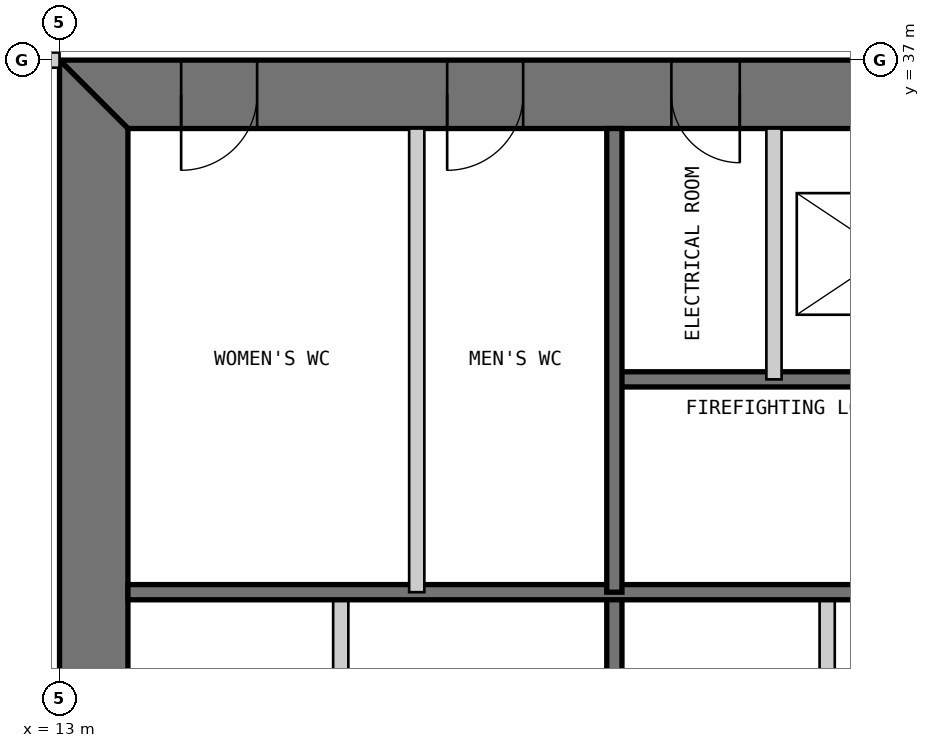
"""IFC4 building model, lengths in metres.
Left out: names, types, materials, properties, quantities, classifications, styles, units other than length and angle.
Written with IfcOpenShell. Run it as: python <this file> out.ifc"""

import sys

from ifc_helpers import new_model, si_unit, direction, frame, frame_2d, origin, place, context, subcontext, project, spatial, polyline, rectangle, outline, extrude, element, fill, save


model = new_model("IFC4")
c1 = context("Model", 3, precision=1e-05, world=origin(), true_north=direction((0.0, 1.0)))
c2 = subcontext(c1, "Body", "Model", "MODEL_VIEW")
j1 = project(units=[si_unit("LENGTHUNIT", "METRE"), si_unit("PLANEANGLEUNIT", "RADIAN")], contexts=[c1])
p1 = place(None, origin())
s1 = spatial("IfcSite", under=j1, at=p1, CompositionType="ELEMENT")
p2 = place(p1, origin())
s2 = spatial("IfcBuilding", under=s1, at=p2, CompositionType="ELEMENT")
p3 = place(p2, frame((0.0, 0.0, 7.0)))
s3 = spatial("IfcBuildingStorey", under=s2, at=p3, CompositionType="ELEMENT", Elevation=7.0)
p4 = place(p3, frame((37.0, 36.55, 0.0), z_axis=(0.0, 0.0, 1.0), x_axis=(-1.0, 0.0, 0.0)))
e1 = element("IfcWall", 1, at=p4, inside=s3, PredefinedType="SHEAR", context=c2, shape_type="SweptSolid", body=[
    extrude(outline(polyline([(0.0, -0.45), (24.0, -0.45), (23.1, 0.45), (0.9, 0.45), (0.0, -0.45)])), origin(), (0.0, 0.0, 1.0), 4.8),
])
p5 = place(p4, frame((4.9, 0.0, 0.0)))
e2 = element("IfcOpeningElement", 2, at=p5, cuts=e1, PredefinedType="OPENING", context=c2, shape_type="SweptSolid", body=[
    extrude(rectangle(XDim=1.0, YDim=2.2, at=frame_2d((0.5, 1.1))), frame((0.0, 0.46, 0.0), z_axis=(0.0, -1.0, 0.0), x_axis=(1.0, 0.0, 0.0)), (0.0, 0.0, 1.0), 0.92),
])
p6 = place(p4, frame((8.9, 0.0, 0.0)))
e3 = element("IfcOpeningElement", 3, at=p6, cuts=e1, PredefinedType="OPENING", context=c2, shape_type="SweptSolid", body=[
    extrude(rectangle(XDim=1.1, YDim=2.2, at=frame_2d((0.55, 1.1))), frame((0.0, 0.46, 0.0), z_axis=(0.0, -1.0, 0.0), x_axis=(1.0, 0.0, 0.0)), (0.0, 0.0, 1.0), 0.92),
])
p7 = place(p4, frame((15.05, 0.0, 0.0)))
e4 = element("IfcOpeningElement", 4, at=p7, cuts=e1, PredefinedType="OPENING", context=c2, shape_type="SweptSolid", body=[
    extrude(rectangle(XDim=0.9, YDim=2.2, at=frame_2d((0.45, 1.1))), frame((0.0, 0.46, 0.0), z_axis=(0.0, -1.0, 0.0), x_axis=(1.0, 0.0, 0.0)), (0.0, 0.0, 1.0), 0.92),
])
p8 = place(p4, frame((17.9, 0.0, 0.0)))
e5 = element("IfcOpeningElement", 5, at=p8, cuts=e1, PredefinedType="OPENING", context=c2, shape_type="SweptSolid", body=[
    extrude(rectangle(XDim=1.0, YDim=2.2, at=frame_2d((0.5, 1.1))), frame((0.0, 0.46, 0.0), z_axis=(0.0, -1.0, 0.0), x_axis=(1.0, 0.0, 0.0)), (0.0, 0.0, 1.0), 0.92),
])
p9 = place(p4, frame((21.4, 0.0, 0.0)))
e6 = element("IfcOpeningElement", 6, at=p9, cuts=e1, PredefinedType="OPENING", context=c2, shape_type="SweptSolid", body=[
    extrude(rectangle(XDim=1.0, YDim=2.2, at=frame_2d((0.5, 1.1))), frame((0.0, 0.46, 0.0), z_axis=(0.0, -1.0, 0.0), x_axis=(1.0, 0.0, 0.0)), (0.0, 0.0, 1.0), 0.92),
])
p10 = place(p3, frame((13.45, 36.1, 0.0), z_axis=(0.0, 0.0, 1.0), x_axis=(0.0, -1.0, 0.0)))
e7 = element("IfcWall", 7, at=p10, inside=s3, PredefinedType="SHEAR", context=c2, shape_type="SweptSolid", body=[
    extrude(outline(polyline([(-0.9, -0.45), (23.1, -0.45), (22.2, 0.45), (0.0, 0.45), (-0.9, -0.45)])), origin(), (0.0, 0.0, 1.0), 4.8),
])
p11 = place(p10, frame((20.2, 0.0, 0.0)))
e8 = element("IfcOpeningElement", 8, at=p11, cuts=e7, PredefinedType="OPENING", context=c2, shape_type="SweptSolid", body=[
    extrude(rectangle(XDim=1.0, YDim=2.2, at=frame_2d((0.5, 1.1))), frame((0.0, 0.46, 0.0), z_axis=(0.0, -1.0, 0.0), x_axis=(1.0, 0.0, 0.0)), (0.0, 0.0, 1.0), 0.92),
])
p12 = place(p10, frame((17.25, 0.0, 0.0)))
e9 = element("IfcOpeningElement", 9, at=p12, cuts=e7, PredefinedType="OPENING", context=c2, shape_type="SweptSolid", body=[
    extrude(rectangle(XDim=0.9, YDim=2.2, at=frame_2d((0.45, 1.1))), frame((0.0, 0.46, 0.0), z_axis=(0.0, -1.0, 0.0), x_axis=(1.0, 0.0, 0.0)), (0.0, 0.0, 1.0), 0.92),
])
p13 = place(p3, frame((16.7, 13.9, 0.0), z_axis=(0.0, 0.0, 1.0), x_axis=(0.0, 1.0, 0.0)))
e10 = element("IfcWall", 10, at=p13, inside=s3, PredefinedType="PARTITIONING", context=c2, shape_type="SweptSolid", body=[
    extrude(rectangle(XDim=16.1, YDim=0.2, at=frame_2d((8.05, 0.0))), origin(), (0.0, 0.0, 1.0), 4.6),
])
p14 = place(p13, frame((4.1, 0.0, 0.0)))
e11 = element("IfcOpeningElement", 11, at=p14, cuts=e10, PredefinedType="OPENING", context=c2, shape_type="SweptSolid", body=[
    extrude(rectangle(XDim=0.9, YDim=2.2, at=frame_2d((0.45, 1.1))), frame((0.0, 0.11, 0.0), z_axis=(0.0, -1.0, 0.0), x_axis=(1.0, 0.0, 0.0)), (0.0, 0.0, 1.0), 0.22),
])
p15 = place(p3, frame((20.3, 13.9, 0.0), z_axis=(0.0, 0.0, 1.0), x_axis=(0.0, 1.0, 0.0)))
e12 = element("IfcWall", 12, at=p15, inside=s3, PredefinedType="SOLIDWALL", context=c2, shape_type="SweptSolid", body=[
    extrude(rectangle(XDim=16.1, YDim=0.2, at=frame_2d((8.05, 0.0))), origin(), (0.0, 0.0, 1.0), 4.6),
])
p16 = place(p3, frame((23.1, 20.0, 0.0), z_axis=(0.0, 0.0, 1.0), x_axis=(0.0, 1.0, 0.0)))
e13 = element("IfcWall", 13, at=p16, inside=s3, PredefinedType="PARTITIONING", context=c2, shape_type="SweptSolid", body=[
    extrude(rectangle(XDim=10.0, YDim=0.2, at=frame_2d((5.0, 0.0))), origin(), (0.0, 0.0, 1.0), 4.6),
])
p17 = place(p3, frame((29.7, 32.8, 0.0), z_axis=(0.0, 0.0, 1.0), x_axis=(-1.0, 0.0, 0.0)))
e14 = element("IfcWall", 14, at=p17, inside=s3, PredefinedType="SOLIDWALL", context=c2, shape_type="SweptSolid", body=[
    extrude(rectangle(XDim=9.4, YDim=0.2, at=frame_2d((4.7, 0.0))), origin(), (0.0, 0.0, 1.0), 4.6),
])
p18 = place(p17, frame((0.25, 0.0, 0.0)))
e15 = element("IfcOpeningElement", 15, at=p18, cuts=e14, PredefinedType="OPENING", context=c2, shape_type="SweptSolid", body=[
    extrude(rectangle(XDim=1.0, YDim=2.2, at=frame_2d((0.5, 1.1))), frame((0.0, 0.11, 0.0), z_axis=(0.0, -1.0, 0.0), x_axis=(1.0, 0.0, 0.0)), (0.0, 0.0, 1.0), 0.22),
])
p19 = place(p3, frame((29.7, 30.0, 0.0), z_axis=(0.0, 0.0, 1.0), x_axis=(-1.0, 0.0, 0.0)))
e16 = element("IfcWall", 16, at=p19, inside=s3, PredefinedType="SOLIDWALL", context=c2, shape_type="SweptSolid", body=[
    extrude(rectangle(XDim=15.8, YDim=0.2, at=frame_2d((7.9, 0.0))), origin(), (0.0, 0.0, 1.0), 4.6),
])
p20 = place(p3, frame((22.4, 36.1, 0.0), z_axis=(0.0, 0.0, 1.0), x_axis=(0.0, -1.0, 0.0)))
e17 = element("IfcWall", 17, at=p20, inside=s3, PredefinedType="PARTITIONING", context=c2, shape_type="SweptSolid", body=[
    extrude(rectangle(XDim=3.3, YDim=0.2, at=frame_2d((1.65, 0.0))), origin(), (0.0, 0.0, 1.0), 4.6),
])
p21 = place(p3, frame((20.3, 36.1, 0.0), z_axis=(0.0, 0.0, 1.0), x_axis=(0.0, -1.0, 0.0)))
e18 = element("IfcWall", 18, at=p21, inside=s3, PredefinedType="SOLIDWALL", context=c2, shape_type="SweptSolid", body=[
    extrude(rectangle(XDim=6.1, YDim=0.2, at=frame_2d((3.05, 0.0))), origin(), (0.0, 0.0, 1.0), 4.6),
])
p22 = place(p3, frame((17.7, 36.1, 0.0), z_axis=(0.0, 0.0, 1.0), x_axis=(0.0, -1.0, 0.0)))
e19 = element("IfcWall", 19, at=p22, inside=s3, PredefinedType="PARTITIONING", context=c2, shape_type="SweptSolid", body=[
    extrude(rectangle(XDim=6.1, YDim=0.2, at=frame_2d((3.05, 0.0))), origin(), (0.0, 0.0, 1.0), 4.6),
])
p23 = place(p3, frame((7.0, 37.0, 0.0), z_axis=(0.0, 0.0, 1.0), x_axis=(1.0, 0.0, 0.0)))
e20 = element("IfcWall", 20, at=p23, inside=s3, PredefinedType="PARTITIONING", context=c2, shape_type="SweptSolid", body=[
    extrude(rectangle(XDim=6.0, YDim=0.2, at=frame_2d((3.0, 0.0))), origin(), (0.0, 0.0, 1.0), 3.653),
])
p24 = place(p7, origin())
e21 = element("IfcDoor", 21, at=p24, inside=s3, OperationType="SINGLE_SWING_LEFT", PredefinedType="DOOR", context=c2, shape_type="SweptSolid", body=[
    extrude(rectangle(XDim=0.9, YDim=2.2, at=frame_2d((0.45, 1.1))), frame((0.0, 0.025, 0.0), z_axis=(0.0, -1.0, 0.0), x_axis=(1.0, 0.0, 0.0)), (0.0, 0.0, 1.0), 0.05),
    extrude(outline(polyline([(0.0, 0.0), (0.04, 0.0), (0.04, 2.16), (0.86, 2.16), (0.86, 0.0), (0.9, 0.0), (0.9, 2.2), (0.0, 2.2), (0.0, 0.0)])), frame((0.0, 0.3, 0.0), z_axis=(0.0, -1.0, 0.0), x_axis=(1.0, 0.0, 0.0)), (0.0, 0.0, 1.0), 0.6),
])
fill(e4, e21)
p25 = place(p8, origin())
e22 = element("IfcDoor", 22, at=p25, inside=s3, OperationType="SINGLE_SWING_RIGHT", PredefinedType="DOOR", context=c2, shape_type="SweptSolid", body=[
    extrude(rectangle(XDim=1.0, YDim=2.2, at=frame_2d((0.5, 1.1))), frame((0.0, 0.025, 0.0), z_axis=(0.0, -1.0, 0.0), x_axis=(1.0, 0.0, 0.0)), (0.0, 0.0, 1.0), 0.05),
    extrude(outline(polyline([(0.0, 0.0), (0.04, 0.0), (0.04, 2.16), (0.96, 2.16), (0.96, 0.0), (1.0, 0.0), (1.0, 2.2), (0.0, 2.2), (0.0, 0.0)])), frame((0.0, 0.3, 0.0), z_axis=(0.0, -1.0, 0.0), x_axis=(1.0, 0.0, 0.0)), (0.0, 0.0, 1.0), 0.6),
])
fill(e5, e22)
p26 = place(p9, origin())
e23 = element("IfcDoor", 23, at=p26, inside=s3, OperationType="SINGLE_SWING_RIGHT", PredefinedType="DOOR", context=c2, shape_type="SweptSolid", body=[
    extrude(rectangle(XDim=1.0, YDim=2.2, at=frame_2d((0.5, 1.1))), frame((0.0, 0.025, 0.0), z_axis=(0.0, -1.0, 0.0), x_axis=(1.0, 0.0, 0.0)), (0.0, 0.0, 1.0), 0.05),
    extrude(outline(polyline([(0.0, 0.0), (0.04, 0.0), (0.04, 2.16), (0.96, 2.16), (0.96, 0.0), (1.0, 0.0), (1.0, 2.2), (0.0, 2.2), (0.0, 0.0)])), frame((0.0, 0.3, 0.0), z_axis=(0.0, -1.0, 0.0), x_axis=(1.0, 0.0, 0.0)), (0.0, 0.0, 1.0), 0.6),
])
fill(e6, e23)
save(model, sys.argv[1])
